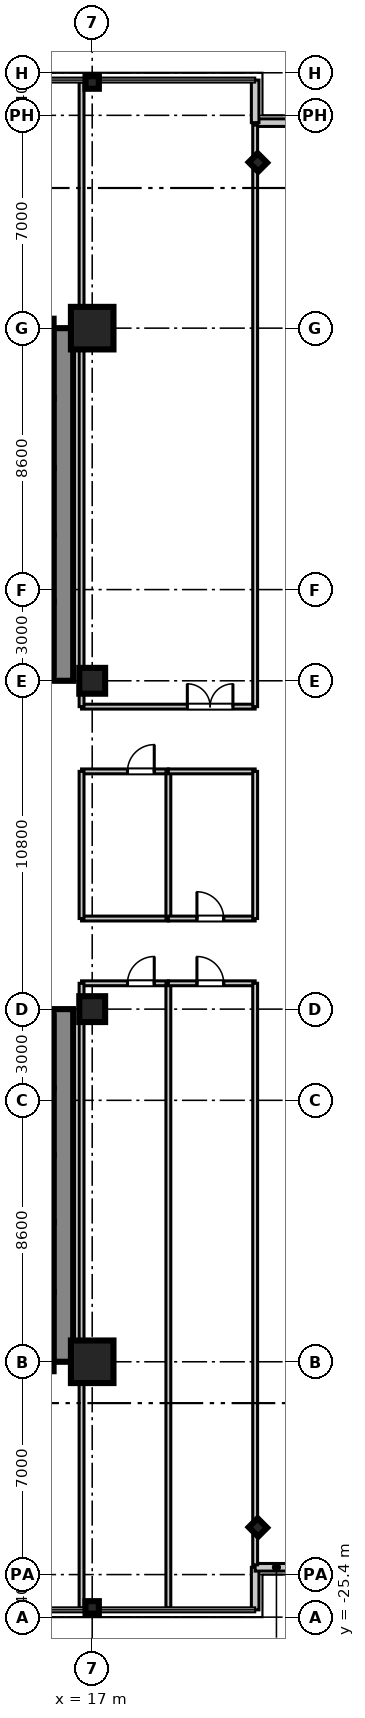
"""IFC4 building model, lengths in metres.
Left out: names, types, materials, properties, quantities, classifications, styles, units other than length and angle.
Written with IfcOpenShell. Run it as: python <this file> out.ifc"""

import sys

from ifc_helpers import new_model, si_unit, direction, frame, frame_2d, origin, origin_2d, place, context, subcontext, project, spatial, rectangle, i_section, extrude, source, transform, mapped, element, fill, save


model = new_model("IFC4")
c1 = context("Model", 3, precision=1e-05, world=origin(), true_north=direction((0.0, 1.0)))
c2 = subcontext(c1, "Body", "Model", "MODEL_VIEW")
j1 = project(units=[si_unit("LENGTHUNIT", "METRE"), si_unit("PLANEANGLEUNIT", "RADIAN")], contexts=[c1])
p1 = place(None, origin())
s1 = spatial("IfcSite", under=j1, at=p1, CompositionType="ELEMENT")
p2 = place(p1, origin())
s2 = spatial("IfcBuilding", under=s1, at=p2, CompositionType="ELEMENT")
p3 = place(p2, frame((0.0, 0.0, 76.2)))
s3 = spatial("IfcBuildingStorey", under=s2, at=p3, CompositionType="ELEMENT", Elevation=76.2)
m1 = source(origin(), c2, "Body", "SweptSolid", [
    extrude(rectangle(XDim=1.4, YDim=1.4, at=origin_2d()), origin(), (0.0, 0.0, 1.0), 3.605),
])
p4 = place(p3, frame((17.0, -17.0, 0.0), z_axis=(0.0, 0.0, 1.0), x_axis=(1.0, 0.0, 0.0)))
e1 = element("IfcColumn", 1, at=p4, inside=s3, PredefinedType="COLUMN", context=c2, shape_type="MappedRepresentation", body=[
    mapped(m1, transform((0.0, 0.0, 0.0), scale=1.0)),
])
m2 = source(origin(), c2, "Body", "SweptSolid", [
    extrude(rectangle(XDim=0.85, YDim=0.85, at=origin_2d()), origin(), (0.0, 0.0, 1.0), 3.605),
])
for number, where, z_axis, x_axis in (
    (2, (17.0, -5.4, 0.0), (0.0, 0.0, 1.0), (1.0, 0.0, 0.0)),
    (3, (17.0, 5.4, 0.0), (0.0, 0.0, 1.0), (1.0, 0.0, 0.0)),
):
    element("IfcColumn", number, at=place(p3, frame(where, z_axis=z_axis, x_axis=x_axis)), inside=s3, PredefinedType="PILASTER", context=c2, shape_type="MappedRepresentation", body=[
        mapped(m2, transform((0.0, 0.0, 0.0), scale=1.0)),
    ])
p5 = place(p3, frame((17.0, 17.0, 0.0), z_axis=(0.0, 0.0, 1.0), x_axis=(1.0, 0.0, 0.0)))
e4 = element("IfcColumn", 4, at=p5, inside=s3, PredefinedType="COLUMN", context=c2, shape_type="MappedRepresentation", body=[
    mapped(m1, transform((0.0, 0.0, 0.0), scale=1.0)),
])
m3 = source(origin(), c2, "Body", "SweptSolid", [
    extrude(i_section(OverallWidth=0.412, OverallDepth=0.438, WebThickness=0.023, FlangeThickness=0.036, at=origin_2d()), origin(), (0.0, 0.0, 1.0), 3.505),
])
for number, where, z_axis, x_axis in (
    (5, (17.0, -25.08, 0.0), (0.0, 0.0, 1.0), (0.0, 1.0, 0.0)),
    (6, (17.0, 25.08, 0.0), (0.0, 0.0, 1.0), (0.0, 1.0, 0.0)),
    (7, (22.45, -22.45, 0.0), (0.0, 0.0, 1.0), (0.707, 0.707, 0.0)),
    (8, (22.45, 22.45, 0.0), (0.0, 0.0, 1.0), (0.707, 0.707, 0.0)),
):
    element("IfcColumn", number, at=place(p3, frame(where, z_axis=z_axis, x_axis=x_axis)), inside=s3, PredefinedType="COLUMN", context=c2, shape_type="MappedRepresentation", body=[
        mapped(m3, transform((0.0, 0.0, 0.0), scale=1.0)),
    ])
m4 = source(origin(), c2, "Body", "SweptSolid", [
    extrude(rectangle(XDim=11.6, YDim=0.65, at=frame_2d((5.8, 0.0))), origin(), (0.0, 0.0, 1.0), 3.37),
])
for number, where, z_axis, x_axis in (
    (9, (16.05, 5.4, 0.0), (0.0, 0.0, 1.0), (0.0, 1.0, 0.0)),
    (10, (16.05, -17.0, 0.0), (0.0, 0.0, 1.0), (0.0, 1.0, 0.0)),
):
    element("IfcWall", number, at=place(p3, frame(where, z_axis=z_axis, x_axis=x_axis)), inside=s3, PredefinedType="SHEAR", context=c2, shape_type="MappedRepresentation", body=[
        mapped(m4, transform((0.0, 0.0, 0.0), scale=1.0)),
    ])
m5 = source(origin(), c2, "Body", "SweptSolid", [
    extrude(rectangle(XDim=2.36, YDim=0.22, at=frame_2d((1.18, 0.0))), origin(), (0.0, 0.0, 1.0), 3.37),
])
p6 = place(p3, frame((15.62, 5.64, 0.0), z_axis=(0.0, 0.0, 1.0), x_axis=(0.0, 1.0, 0.0)))
e11 = element("IfcWall", 11, at=p6, inside=s3, PredefinedType="SHEAR", context=c2, shape_type="MappedRepresentation", body=[
    mapped(m5, transform((0.0, 0.0, 0.0), scale=1.0)),
])
m6 = source(origin(), c2, "Body", "SweptSolid", [
    extrude(rectangle(XDim=2.2, YDim=0.22, at=frame_2d((1.1, 0.0))), origin(), (0.0, 0.0, 1.0), 3.37),
])
for number, where, z_axis, x_axis in (
    (12, (15.62, 8.0, 0.0), (0.0, 0.0, 1.0), (0.0, 1.0, 0.0)),
    (13, (15.62, 10.2, 0.0), (0.0, 0.0, 1.0), (0.0, 1.0, 0.0)),
):
    element("IfcWall", number, at=place(p3, frame(where, z_axis=z_axis, x_axis=x_axis)), inside=s3, PredefinedType="SHEAR", context=c2, shape_type="MappedRepresentation", body=[
        mapped(m6, transform((0.0, 0.0, 0.0), scale=1.0)),
    ])
m7 = source(origin(), c2, "Body", "SweptSolid", [
    extrude(rectangle(XDim=2.3, YDim=0.22, at=frame_2d((1.15, 0.0))), origin(), (0.0, 0.0, 1.0), 3.37),
])
p7 = place(p3, frame((15.62, 12.4, 0.0), z_axis=(0.0, 0.0, 1.0), x_axis=(0.0, 1.0, 0.0)))
e14 = element("IfcWall", 14, at=p7, inside=s3, PredefinedType="SHEAR", context=c2, shape_type="MappedRepresentation", body=[
    mapped(m7, transform((0.0, 0.0, 0.0), scale=1.0)),
])
p8 = place(p3, frame((15.62, -8.0, 0.0), z_axis=(0.0, 0.0, 1.0), x_axis=(0.0, 1.0, 0.0)))
e15 = element("IfcWall", 15, at=p8, inside=s3, PredefinedType="SHEAR", context=c2, shape_type="MappedRepresentation", body=[
    mapped(m5, transform((0.0, 0.0, 0.0), scale=1.0)),
])
for number, where, z_axis, x_axis in (
    (16, (15.62, -10.2, 0.0), (0.0, 0.0, 1.0), (0.0, 1.0, 0.0)),
    (17, (15.62, -12.4, 0.0), (0.0, 0.0, 1.0), (0.0, 1.0, 0.0)),
):
    element("IfcWall", number, at=place(p3, frame(where, z_axis=z_axis, x_axis=x_axis)), inside=s3, PredefinedType="SHEAR", context=c2, shape_type="MappedRepresentation", body=[
        mapped(m6, transform((0.0, 0.0, 0.0), scale=1.0)),
    ])
p9 = place(p3, frame((15.62, -14.7, 0.0), z_axis=(0.0, 0.0, 1.0), x_axis=(0.0, 1.0, 0.0)))
e18 = element("IfcWall", 18, at=p9, inside=s3, PredefinedType="SHEAR", context=c2, shape_type="MappedRepresentation", body=[
    mapped(m7, transform((0.0, 0.0, 0.0), scale=1.0)),
])
m8 = source(origin(), c2, "Body", "SweptSolid", [
    extrude(rectangle(XDim=2.61, YDim=0.22, at=frame_2d((1.305, 0.0))), origin(), (0.0, 0.0, 1.0), 3.37),
])
for number, where, z_axis, x_axis in (
    (19, (15.62, 14.7, 0.0), (0.0, 0.0, 1.0), (0.0, 1.0, 0.0)),
    (20, (15.62, -17.31, 0.0), (0.0, 0.0, 1.0), (0.0, 1.0, 0.0)),
):
    element("IfcWall", number, at=place(p3, frame(where, z_axis=z_axis, x_axis=x_axis)), inside=s3, PredefinedType="SHEAR", context=c2, shape_type="MappedRepresentation", body=[
        mapped(m8, transform((0.0, 0.0, 0.0), scale=1.0)),
    ])
m9 = source(origin(), c2, "Body", "SweptSolid", [
    extrude(rectangle(XDim=1.4, YDim=0.25, at=frame_2d((0.7, 0.0))), origin(), (0.0, 0.0, 1.0), 3.37),
])
for number, where, z_axis, x_axis in (
    (21, (22.36, -25.16, 0.0), (0.0, 0.0, 1.0), (0.0, 1.0, 0.0)),
    (22, (22.36, -23.76, 0.0), (0.0, 0.0, 1.0), (1.0, 0.0, 0.0)),
    (23, (22.36, 23.76, 0.0), (0.0, 0.0, 1.0), (1.0, 0.0, 0.0)),
    (24, (22.36, 23.76, 0.0), (0.0, 0.0, 1.0), (0.0, 1.0, 0.0)),
):
    element("IfcWall", number, at=place(p3, frame(where, z_axis=z_axis, x_axis=x_axis)), inside=s3, PredefinedType="STANDARD", context=c2, shape_type="MappedRepresentation", body=[
        mapped(m9, transform((0.0, 0.0, 0.0), scale=1.0)),
    ])
m10 = source(origin(), c2, "Body", "SweptSolid", [
    extrude(rectangle(XDim=5.71, YDim=0.16, at=frame_2d((2.855, 0.0))), origin(), (0.0, 0.0, 1.0), 2.71),
])
p10 = place(p3, frame((16.65, 4.55, 0.0), z_axis=(0.0, 0.0, 1.0), x_axis=(1.0, 0.0, 0.0)))
e25 = element("IfcWall", 25, at=p10, inside=s3, PredefinedType="PARTITIONING", context=c2, shape_type="MappedRepresentation", body=[
    mapped(m10, transform((0.0, 0.0, 0.0), scale=1.0)),
])
p11 = place(p10, frame((3.479, 0.0, 0.0)))
e26 = element("IfcOpeningElement", 26, at=p11, cuts=e25, PredefinedType="OPENING", context=c2, shape_type="SweptSolid", body=[
    extrude(rectangle(XDim=1.5, YDim=2.15, at=frame_2d((0.75, 1.075))), frame((0.0, 0.09, 0.0), z_axis=(0.0, -1.0, 0.0), x_axis=(1.0, 0.0, 0.0)), (0.0, 0.0, 1.0), 0.18),
])
m11 = source(origin(), c2, "Body", "SweptSolid", [
    extrude(rectangle(XDim=20.55, YDim=0.16, at=frame_2d((10.275, 0.0))), origin(), (0.0, 0.0, 1.0), 2.71),
])
p12 = place(p3, frame((16.65, 4.55, 0.0), z_axis=(0.0, 0.0, 1.0), x_axis=(0.0, 1.0, 0.0)))
e27 = element("IfcWall", 27, at=p12, inside=s3, PredefinedType="PARTITIONING", context=c2, shape_type="MappedRepresentation", body=[
    mapped(m11, transform((0.0, 0.0, 0.0), scale=1.0)),
])
m12 = source(origin(), c2, "Body", "SweptSolid", [
    extrude(rectangle(XDim=19.13, YDim=0.16, at=frame_2d((9.565, 0.0))), origin(), (0.0, 0.0, 1.0), 2.71),
])
p13 = place(p3, frame((22.36, 4.55, 0.0), z_axis=(0.0, 0.0, 1.0), x_axis=(0.0, 1.0, 0.0)))
e28 = element("IfcWall", 28, at=p13, inside=s3, PredefinedType="PARTITIONING", context=c2, shape_type="MappedRepresentation", body=[
    mapped(m12, transform((0.0, 0.0, 0.0), scale=1.0)),
])
m13 = source(origin(), c2, "Body", "SweptSolid", [
    extrude(rectangle(XDim=2.855, YDim=0.16, at=frame_2d((1.427, 0.0))), origin(), (0.0, 0.0, 1.0), 2.71),
])
p14 = place(p3, frame((16.65, -4.55, 0.0), z_axis=(0.0, 0.0, 1.0), x_axis=(1.0, 0.0, 0.0)))
e29 = element("IfcWall", 29, at=p14, inside=s3, PredefinedType="PARTITIONING", context=c2, shape_type="MappedRepresentation", body=[
    mapped(m13, transform((0.0, 0.0, 0.0), scale=1.0)),
])
p15 = place(p14, frame((1.511, 0.0, 0.0)))
e30 = element("IfcOpeningElement", 30, at=p15, cuts=e29, PredefinedType="OPENING", context=c2, shape_type="SweptSolid", body=[
    extrude(rectangle(XDim=0.88, YDim=2.1, at=frame_2d((0.44, 1.05))), frame((0.0, 0.09, 0.0), z_axis=(0.0, -1.0, 0.0), x_axis=(1.0, 0.0, 0.0)), (0.0, 0.0, 1.0), 0.18),
])
for number, where, z_axis, x_axis in (
    (31, (16.65, -25.1, 0.0), (0.0, 0.0, 1.0), (0.0, 1.0, 0.0)),
    (32, (19.505, -25.1, 0.0), (0.0, 0.0, 1.0), (0.0, 1.0, 0.0)),
):
    element("IfcWall", number, at=place(p3, frame(where, z_axis=z_axis, x_axis=x_axis)), inside=s3, PredefinedType="PARTITIONING", context=c2, shape_type="MappedRepresentation", body=[
        mapped(m11, transform((0.0, 0.0, 0.0), scale=1.0)),
    ])
m14 = source(origin(), c2, "Body", "SweptSolid", [
    extrude(rectangle(XDim=2.855, YDim=0.16, at=frame_2d((1.428, 0.0))), origin(), (0.0, 0.0, 1.0), 2.71),
])
p16 = place(p3, frame((19.505, -4.55, 0.0), z_axis=(0.0, 0.0, 1.0), x_axis=(1.0, 0.0, 0.0)))
e33 = element("IfcWall", 33, at=p16, inside=s3, PredefinedType="PARTITIONING", context=c2, shape_type="MappedRepresentation", body=[
    mapped(m14, transform((0.0, 0.0, 0.0), scale=1.0)),
])
p17 = place(p16, frame((0.94, 0.0, 0.0)))
e34 = element("IfcOpeningElement", 34, at=p17, cuts=e33, PredefinedType="OPENING", context=c2, shape_type="SweptSolid", body=[
    extrude(rectangle(XDim=0.88, YDim=2.1, at=frame_2d((0.44, 1.05))), frame((0.0, 0.09, 0.0), z_axis=(0.0, -1.0, 0.0), x_axis=(1.0, 0.0, 0.0)), (0.0, 0.0, 1.0), 0.18),
])
p18 = place(p3, frame((22.36, -23.68, 0.0), z_axis=(0.0, 0.0, 1.0), x_axis=(0.0, 1.0, 0.0)))
e35 = element("IfcWall", 35, at=p18, inside=s3, PredefinedType="PARTITIONING", context=c2, shape_type="MappedRepresentation", body=[
    mapped(m12, transform((0.0, 0.0, 0.0), scale=1.0)),
])
p19 = place(p3, frame((16.65, -2.42, 0.0), z_axis=(0.0, 0.0, 1.0), x_axis=(1.0, 0.0, 0.0)))
e36 = element("IfcWall", 36, at=p19, inside=s3, PredefinedType="PARTITIONING", context=c2, shape_type="MappedRepresentation", body=[
    mapped(m13, transform((0.0, 0.0, 0.0), scale=1.0)),
])
p20 = place(p3, frame((16.65, 2.42, 0.0), z_axis=(0.0, 0.0, 1.0), x_axis=(1.0, 0.0, 0.0)))
e37 = element("IfcWall", 37, at=p20, inside=s3, PredefinedType="PARTITIONING", context=c2, shape_type="MappedRepresentation", body=[
    mapped(m13, transform((0.0, 0.0, 0.0), scale=1.0)),
])
p21 = place(p20, frame((1.511, 0.0, 0.0)))
e38 = element("IfcOpeningElement", 38, at=p21, cuts=e37, PredefinedType="OPENING", context=c2, shape_type="SweptSolid", body=[
    extrude(rectangle(XDim=0.88, YDim=2.1, at=frame_2d((0.44, 1.05))), frame((0.0, 0.09, 0.0), z_axis=(0.0, -1.0, 0.0), x_axis=(1.0, 0.0, 0.0)), (0.0, 0.0, 1.0), 0.18),
])
m15 = source(origin(), c2, "Body", "SweptSolid", [
    extrude(rectangle(XDim=4.84, YDim=0.16, at=frame_2d((2.42, 0.0))), origin(), (0.0, 0.0, 1.0), 2.71),
])
for number, where, z_axis, x_axis in (
    (39, (16.65, -2.42, 0.0), (0.0, 0.0, 1.0), (0.0, 1.0, 0.0)),
    (40, (19.505, -2.42, 0.0), (0.0, 0.0, 1.0), (0.0, 1.0, 0.0)),
):
    element("IfcWall", number, at=place(p3, frame(where, z_axis=z_axis, x_axis=x_axis)), inside=s3, PredefinedType="PARTITIONING", context=c2, shape_type="MappedRepresentation", body=[
        mapped(m15, transform((0.0, 0.0, 0.0), scale=1.0)),
    ])
p22 = place(p3, frame((19.505, -2.42, 0.0), z_axis=(0.0, 0.0, 1.0), x_axis=(1.0, 0.0, 0.0)))
e41 = element("IfcWall", 41, at=p22, inside=s3, PredefinedType="PARTITIONING", context=c2, shape_type="MappedRepresentation", body=[
    mapped(m14, transform((0.0, 0.0, 0.0), scale=1.0)),
])
p23 = place(p22, frame((0.94, 0.0, 0.0)))
e42 = element("IfcOpeningElement", 42, at=p23, cuts=e41, PredefinedType="OPENING", context=c2, shape_type="SweptSolid", body=[
    extrude(rectangle(XDim=0.88, YDim=2.1, at=frame_2d((0.44, 1.05))), frame((0.0, 0.09, 0.0), z_axis=(0.0, -1.0, 0.0), x_axis=(1.0, 0.0, 0.0)), (0.0, 0.0, 1.0), 0.18),
])
p24 = place(p3, frame((19.505, 2.42, 0.0), z_axis=(0.0, 0.0, 1.0), x_axis=(1.0, 0.0, 0.0)))
e43 = element("IfcWall", 43, at=p24, inside=s3, PredefinedType="PARTITIONING", context=c2, shape_type="MappedRepresentation", body=[
    mapped(m14, transform((0.0, 0.0, 0.0), scale=1.0)),
])
p25 = place(p3, frame((22.36, -2.42, 0.0), z_axis=(0.0, 0.0, 1.0), x_axis=(0.0, 1.0, 0.0)))
e44 = element("IfcWall", 44, at=p25, inside=s3, PredefinedType="PARTITIONING", context=c2, shape_type="MappedRepresentation", body=[
    mapped(m15, transform((0.0, 0.0, 0.0), scale=1.0)),
])
m16 = source(origin(), c2, "Body", "SweptSolid", [
    extrude(rectangle(XDim=1.5, YDim=2.15, at=frame_2d((0.75, 1.075))), frame((0.0, 0.025, 0.0), z_axis=(0.0, -1.0, 0.0), x_axis=(1.0, 0.0, 0.0)), (0.0, 0.0, 1.0), 0.05),
])
p26 = place(p11, origin())
e45 = element("IfcDoor", 45, at=p26, inside=s3, OperationType="DOUBLE_DOOR_SINGLE_SWING", PredefinedType="DOOR", context=c2, shape_type="MappedRepresentation", body=[
    mapped(m16, transform((0.0, 0.0, 0.0), scale=1.0)),
])
fill(e26, e45)
m17 = source(origin(), c2, "Body", "SweptSolid", [
    extrude(rectangle(XDim=0.88, YDim=2.1, at=frame_2d((0.44, 1.05))), frame((0.0, 0.025, 0.0), z_axis=(0.0, -1.0, 0.0), x_axis=(1.0, 0.0, 0.0)), (0.0, 0.0, 1.0), 0.05),
])
p27 = place(p15, frame((0.88, 0.0, 0.0), z_axis=(0.0, 0.0, 1.0), x_axis=(-1.0, 0.0, 0.0)))
e46 = element("IfcDoor", 46, at=p27, inside=s3, OperationType="SINGLE_SWING_RIGHT", PredefinedType="DOOR", context=c2, shape_type="MappedRepresentation", body=[
    mapped(m17, transform((0.0, 0.0, 0.0), scale=1.0)),
])
fill(e30, e46)
p28 = place(p17, frame((0.88, 0.0, 0.0), z_axis=(0.0, 0.0, 1.0), x_axis=(-1.0, 0.0, 0.0)))
e47 = element("IfcDoor", 47, at=p28, inside=s3, OperationType="SINGLE_SWING_LEFT", PredefinedType="DOOR", context=c2, shape_type="MappedRepresentation", body=[
    mapped(m17, transform((0.0, 0.0, 0.0), scale=1.0)),
])
fill(e34, e47)
p29 = place(p21, frame((0.88, 0.0, 0.0), z_axis=(0.0, 0.0, 1.0), x_axis=(-1.0, 0.0, 0.0)))
e48 = element("IfcDoor", 48, at=p29, inside=s3, OperationType="SINGLE_SWING_RIGHT", PredefinedType="DOOR", context=c2, shape_type="MappedRepresentation", body=[
    mapped(m17, transform((0.0, 0.0, 0.0), scale=1.0)),
])
fill(e38, e48)
p30 = place(p23, origin())
e49 = element("IfcDoor", 49, at=p30, inside=s3, OperationType="SINGLE_SWING_LEFT", PredefinedType="DOOR", context=c2, shape_type="MappedRepresentation", body=[
    mapped(m17, transform((0.0, 0.0, 0.0), scale=1.0)),
])
fill(e42, e49)
save(model, sys.argv[1])
